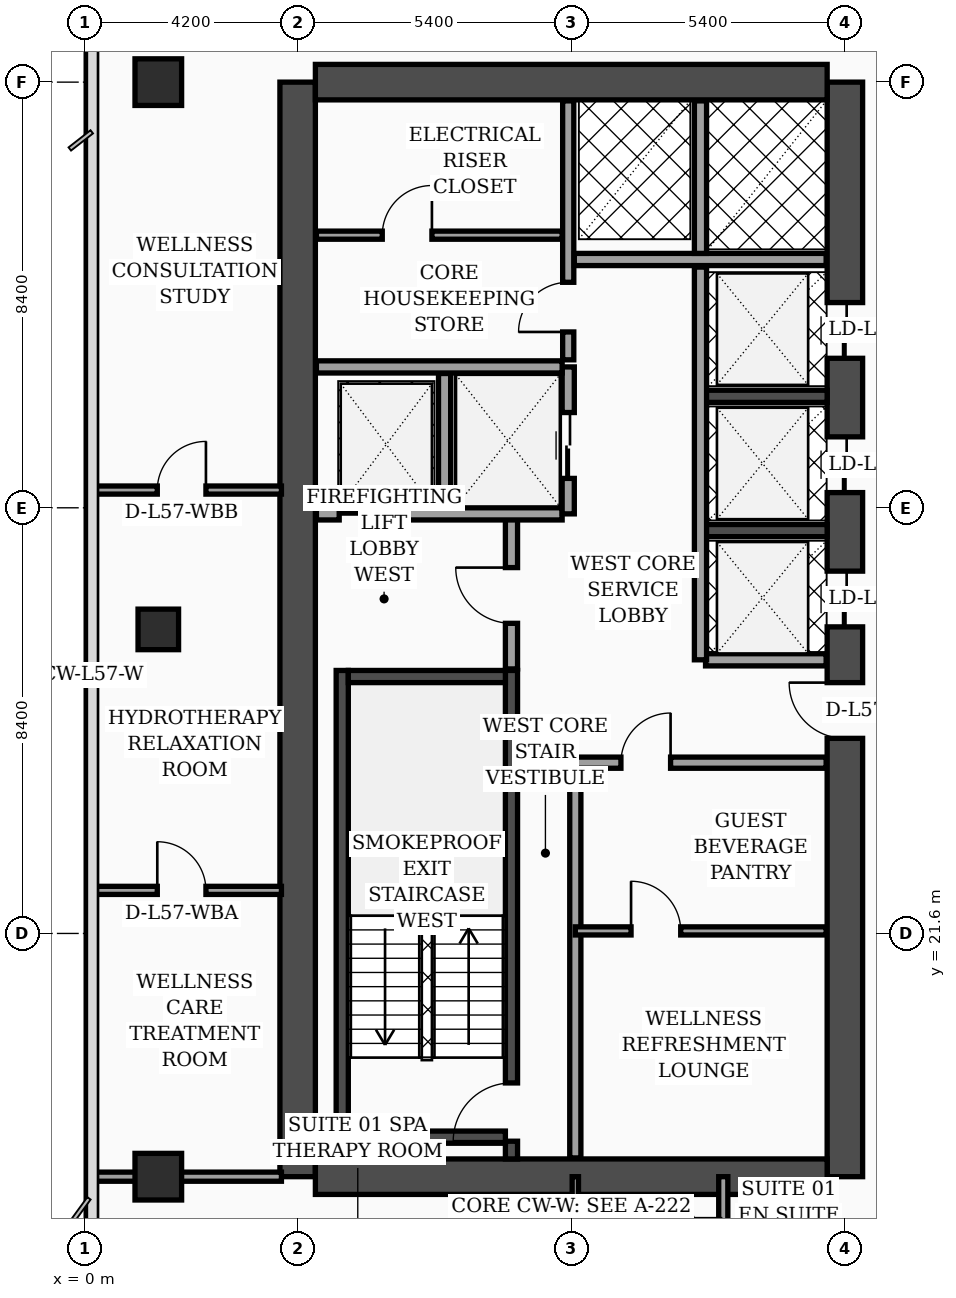
"""IFC4 building model, lengths in metres.
Left out: names, types, materials, properties, quantities, classifications, styles, units other than length and angle.
Written with IfcOpenShell. Run it as: python <this file> out.ifc"""

import sys

from ifc_helpers import new_model, si_unit, direction, frame, frame_2d, origin, origin_2d, place, context, subcontext, project, spatial, rectangle, extrude, element, fill, save


model = new_model("IFC4")
c1 = context("Model", 3, precision=1e-05, world=origin(), true_north=direction((0.0, 1.0)))
c2 = subcontext(c1, "Body", "Model", "MODEL_VIEW")
j1 = project(units=[si_unit("LENGTHUNIT", "METRE"), si_unit("PLANEANGLEUNIT", "RADIAN")], contexts=[c1])
p1 = place(None, origin())
s1 = spatial("IfcSite", under=j1, at=p1, CompositionType="ELEMENT")
p2 = place(p1, origin())
s2 = spatial("IfcBuilding", under=s1, at=p2, CompositionType="ELEMENT")
p3 = place(p2, frame((0.0, 0.0, 230.7)))
s3 = spatial("IfcBuildingStorey", under=s2, at=p3, CompositionType="ELEMENT", Elevation=230.7)
p4 = place(p3, frame((4.2, 16.8, 0.0), z_axis=(0.0, 0.0, 1.0), x_axis=(0.0, 1.0, 0.0)))
e1 = element("IfcWall", 1, at=p4, inside=s3, PredefinedType="SHEAR", context=c2, shape_type="SweptSolid", body=[
    extrude(rectangle(XDim=21.6, YDim=0.7, at=frame_2d((10.8, 0.0))), origin(), (0.0, 0.0, 1.0), 3.52),
])
p5 = place(p3, frame((15.0, 16.8, 0.0), z_axis=(0.0, 0.0, 1.0), x_axis=(0.0, 1.0, 0.0)))
e2 = element("IfcWall", 2, at=p5, inside=s3, PredefinedType="SHEAR", context=c2, shape_type="SweptSolid", body=[
    extrude(rectangle(XDim=21.6, YDim=0.7, at=frame_2d((10.8, 0.0))), origin(), (0.0, 0.0, 1.0), 3.52),
])
p6 = place(p5, frame((8.65, 0.0, 0.0)))
e3 = element("IfcOpeningElement", 3, at=p6, cuts=e2, PredefinedType="OPENING", context=c2, shape_type="SweptSolid", body=[
    extrude(rectangle(XDim=1.1, YDim=2.2, at=frame_2d((0.55, 1.1))), frame((0.0, 0.36, 0.0), z_axis=(0.0, -1.0, 0.0), x_axis=(1.0, 0.0, 0.0)), (0.0, 0.0, 1.0), 0.72),
])
p7 = place(p5, frame((10.85, 0.0, 0.0)))
e4 = element("IfcOpeningElement", 4, at=p7, cuts=e2, PredefinedType="OPENING", context=c2, shape_type="SweptSolid", body=[
    extrude(rectangle(XDim=1.1, YDim=2.2, at=frame_2d((0.55, 1.1))), frame((0.0, 0.36, 0.0), z_axis=(0.0, -1.0, 0.0), x_axis=(1.0, 0.0, 0.0)), (0.0, 0.0, 1.0), 0.72),
])
p8 = place(p5, frame((13.5, 0.0, 0.0)))
e5 = element("IfcOpeningElement", 5, at=p8, cuts=e2, PredefinedType="OPENING", context=c2, shape_type="SweptSolid", body=[
    extrude(rectangle(XDim=1.1, YDim=2.2, at=frame_2d((0.55, 1.1))), frame((0.0, 0.36, 0.0), z_axis=(0.0, -1.0, 0.0), x_axis=(1.0, 0.0, 0.0)), (0.0, 0.0, 1.0), 0.72),
])
p9 = place(p5, frame((16.15, 0.0, 0.0)))
e6 = element("IfcOpeningElement", 6, at=p9, cuts=e2, PredefinedType="OPENING", context=c2, shape_type="SweptSolid", body=[
    extrude(rectangle(XDim=1.1, YDim=2.2, at=frame_2d((0.55, 1.1))), frame((0.0, 0.36, 0.0), z_axis=(0.0, -1.0, 0.0), x_axis=(1.0, 0.0, 0.0)), (0.0, 0.0, 1.0), 0.72),
])
for number, where, z_axis, x_axis in (
    (7, (4.55, 38.4, 0.0), (0.0, 0.0, 1.0), (1.0, 0.0, 0.0)),
    (8, (4.55, 16.8, 0.0), (0.0, 0.0, 1.0), (1.0, 0.0, 0.0)),
):
    element("IfcWall", number, at=place(p3, frame(where, z_axis=z_axis, x_axis=x_axis)), inside=s3, PredefinedType="SHEAR", context=c2, shape_type="SweptSolid", body=[
        extrude(rectangle(XDim=10.1, YDim=0.7, at=frame_2d((5.05, 0.0))), origin(), (0.0, 0.0, 1.0), 3.52),
    ])
p10 = place(p3, frame((5.08, 17.15, 0.0), z_axis=(0.0, 0.0, 1.0), x_axis=(0.0, 1.0, 0.0)))
e9 = element("IfcWall", 9, at=p10, inside=s3, PredefinedType="SOLIDWALL", context=c2, shape_type="SweptSolid", body=[
    extrude(rectangle(XDim=9.64, YDim=0.24, at=frame_2d((4.82, 0.0))), origin(), (0.0, 0.0, 1.0), 3.52),
])
p11 = place(p3, frame((8.42, 17.15, 0.0), z_axis=(0.0, 0.0, 1.0), x_axis=(0.0, 1.0, 0.0)))
e10 = element("IfcWall", 10, at=p11, inside=s3, PredefinedType="SOLIDWALL", context=c2, shape_type="SweptSolid", body=[
    extrude(rectangle(XDim=9.64, YDim=0.24, at=frame_2d((4.82, 0.0))), origin(), (0.0, 0.0, 1.0), 3.52),
])
p12 = place(p11, frame((0.35, 0.0, 0.0)))
e11 = element("IfcOpeningElement", 11, at=p12, cuts=e10, PredefinedType="OPENING", context=c2, shape_type="SweptSolid", body=[
    extrude(rectangle(XDim=1.15, YDim=2.2, at=frame_2d((0.575, 1.1))), frame((0.0, 0.13, 0.0), z_axis=(0.0, -1.0, 0.0), x_axis=(1.0, 0.0, 0.0)), (0.0, 0.0, 1.0), 0.26),
])
for number, where, z_axis, x_axis in (
    (12, (5.2, 17.58, 0.0), (0.0, 0.0, 1.0), (1.0, 0.0, 0.0)),
    (13, (5.2, 26.67, 0.0), (0.0, 0.0, 1.0), (1.0, 0.0, 0.0)),
):
    element("IfcWall", number, at=place(p3, frame(where, z_axis=z_axis, x_axis=x_axis)), inside=s3, PredefinedType="SOLIDWALL", context=c2, shape_type="SweptSolid", body=[
        extrude(rectangle(XDim=3.1, YDim=0.24, at=frame_2d((1.55, 0.0))), origin(), (0.0, 0.0, 1.0), 3.52),
    ])
for number, where, z_axis, x_axis in (
    (14, (12.18, 29.55, 0.0), (0.0, 0.0, 1.0), (1.0, 0.0, 0.0)),
    (15, (12.18, 32.2, 0.0), (0.0, 0.0, 1.0), (1.0, 0.0, 0.0)),
):
    element("IfcWall", number, at=place(p3, frame(where, z_axis=z_axis, x_axis=x_axis)), inside=s3, PredefinedType="SOLIDWALL", context=c2, shape_type="SweptSolid", body=[
        extrude(rectangle(XDim=2.47, YDim=0.24, at=frame_2d((1.235, 0.0))), origin(), (0.0, 0.0, 1.0), 3.52),
    ])
p13 = place(p3, frame((1.45, 16.8, 0.0), z_axis=(0.0, 0.0, 1.0), x_axis=(1.0, 0.0, 0.0)))
e16 = element("IfcColumn", 16, at=p13, inside=s3, PredefinedType="COLUMN", context=c2, shape_type="SweptSolid", body=[
    extrude(rectangle(XDim=0.92, YDim=0.92, at=origin_2d()), origin(), (0.0, 0.0, 1.0), 3.52),
])
p14 = place(p3, frame((1.45, 27.6, 0.0), z_axis=(0.0, 0.0, 1.0), x_axis=(1.0, 0.0, 0.0)))
e17 = element("IfcColumn", 17, at=p14, inside=s3, PredefinedType="COLUMN", context=c2, shape_type="SweptSolid", body=[
    extrude(rectangle(XDim=0.8, YDim=0.8, at=origin_2d()), origin(), (0.0, 0.0, 1.0), 3.52),
])
p15 = place(p3, frame((1.45, 38.4, 0.0), z_axis=(0.0, 0.0, 1.0), x_axis=(1.0, 0.0, 0.0)))
e18 = element("IfcColumn", 18, at=p15, inside=s3, PredefinedType="COLUMN", context=c2, shape_type="SweptSolid", body=[
    extrude(rectangle(XDim=0.92, YDim=0.92, at=origin_2d()), origin(), (0.0, 0.0, 1.0), 3.52),
])
p16 = place(p3, frame((8.42, 26.82, 0.0), z_axis=(0.0, 0.0, 1.0), x_axis=(0.0, 1.0, 0.0)))
e19 = element("IfcWall", 19, at=p16, inside=s3, PredefinedType="SOLIDWALL", context=c2, shape_type="SweptSolid", body=[
    extrude(rectangle(XDim=3.0, YDim=0.24, at=frame_2d((1.5, 0.0))), origin(), (0.0, 0.0, 1.0), 3.52),
])
p17 = place(p16, frame((0.9, 0.0, 0.0)))
e20 = element("IfcOpeningElement", 20, at=p17, cuts=e19, PredefinedType="OPENING", context=c2, shape_type="SweptSolid", body=[
    extrude(rectangle(XDim=1.1, YDim=2.2, at=frame_2d((0.55, 1.1))), frame((0.0, 0.13, 0.0), z_axis=(0.0, -1.0, 0.0), x_axis=(1.0, 0.0, 0.0)), (0.0, 0.0, 1.0), 0.26),
])
p18 = place(p3, frame((4.57, 29.88, 0.0), z_axis=(0.0, 0.0, 1.0), x_axis=(1.0, 0.0, 0.0)))
e21 = element("IfcWall", 21, at=p18, inside=s3, PredefinedType="SOLIDWALL", context=c2, shape_type="SweptSolid", body=[
    extrude(rectangle(XDim=4.85, YDim=0.24, at=frame_2d((2.425, 0.0))), origin(), (0.0, 0.0, 1.0), 3.52),
])
p19 = place(p18, frame((0.45, 0.0, 0.0)))
e22 = element("IfcOpeningElement", 22, at=p19, cuts=e21, PredefinedType="OPENING", context=c2, shape_type="SweptSolid", body=[
    extrude(rectangle(XDim=1.3, YDim=2.35, at=frame_2d((0.65, 1.175))), frame((0.0, 0.13, 0.0), z_axis=(0.0, -1.0, 0.0), x_axis=(1.0, 0.0, 0.0)), (0.0, 0.0, 1.0), 0.26),
])
p20 = place(p3, frame((7.1, 30.02, 0.0), z_axis=(0.0, 0.0, 1.0), x_axis=(0.0, 1.0, 0.0)))
e23 = element("IfcWall", 23, at=p20, inside=s3, PredefinedType="SOLIDWALL", context=c2, shape_type="SweptSolid", body=[
    extrude(rectangle(XDim=2.63, YDim=0.24, at=frame_2d((1.315, 0.0))), origin(), (0.0, 0.0, 1.0), 3.52),
])
p21 = place(p3, frame((9.54, 29.88, 0.0), z_axis=(0.0, 0.0, 1.0), x_axis=(0.0, 1.0, 0.0)))
e24 = element("IfcWall", 24, at=p21, inside=s3, PredefinedType="SOLIDWALL", context=c2, shape_type="SweptSolid", body=[
    extrude(rectangle(XDim=2.9, YDim=0.24, at=frame_2d((1.45, 0.0))), origin(), (0.0, 0.0, 1.0), 3.52),
])
p22 = place(p21, frame((0.7, 0.0, 0.0)))
e25 = element("IfcOpeningElement", 25, at=p22, cuts=e24, PredefinedType="OPENING", context=c2, shape_type="SweptSolid", body=[
    extrude(rectangle(XDim=1.3, YDim=2.35, at=frame_2d((0.65, 1.175))), frame((0.0, 0.13, 0.0), z_axis=(0.0, -1.0, 0.0), x_axis=(1.0, 0.0, 0.0)), (0.0, 0.0, 1.0), 0.26),
])
p23 = place(p3, frame((4.57, 32.78, 0.0), z_axis=(0.0, 0.0, 1.0), x_axis=(1.0, 0.0, 0.0)))
e26 = element("IfcWall", 26, at=p23, inside=s3, PredefinedType="SOLIDWALL", context=c2, shape_type="SweptSolid", body=[
    extrude(rectangle(XDim=4.85, YDim=0.24, at=frame_2d((2.425, 0.0))), origin(), (0.0, 0.0, 1.0), 3.17),
])
p24 = place(p3, frame((9.68, 17.17, 0.0), z_axis=(0.0, 0.0, 1.0), x_axis=(0.0, 1.0, 0.0)))
e27 = element("IfcWall", 27, at=p24, inside=s3, PredefinedType="SOLIDWALL", context=c2, shape_type="SweptSolid", body=[
    extrude(rectangle(XDim=7.83, YDim=0.22, at=frame_2d((3.915, 0.0))), origin(), (0.0, 0.0, 1.0), 3.52),
])
p25 = place(p3, frame((4.57, 35.38, 0.0), z_axis=(0.0, 0.0, 1.0), x_axis=(1.0, 0.0, 0.0)))
e28 = element("IfcWall", 28, at=p25, inside=s3, PredefinedType="PARTITIONING", context=c2, shape_type="SweptSolid", body=[
    extrude(rectangle(XDim=4.85, YDim=0.16, at=frame_2d((2.425, 0.0))), origin(), (0.0, 0.0, 1.0), 3.52),
])
p26 = place(p25, frame((1.3, 0.0, 0.0)))
e29 = element("IfcOpeningElement", 29, at=p26, cuts=e28, PredefinedType="OPENING", context=c2, shape_type="SweptSolid", body=[
    extrude(rectangle(XDim=0.98, YDim=2.15, at=frame_2d((0.49, 1.075))), frame((0.0, 0.09, 0.0), z_axis=(0.0, -1.0, 0.0), x_axis=(1.0, 0.0, 0.0)), (0.0, 0.0, 1.0), 0.18),
])
p27 = place(p3, frame((9.54, 32.92, 0.0), z_axis=(0.0, 0.0, 1.0), x_axis=(0.0, 1.0, 0.0)))
e30 = element("IfcWall", 30, at=p27, inside=s3, PredefinedType="SOLIDWALL", context=c2, shape_type="SweptSolid", body=[
    extrude(rectangle(XDim=5.11, YDim=0.22, at=frame_2d((2.555, 0.0))), origin(), (0.0, 0.0, 1.0), 3.52),
])
p28 = place(p27, frame((0.55, 0.0, 0.0)))
e31 = element("IfcOpeningElement", 31, at=p28, cuts=e30, PredefinedType="OPENING", context=c2, shape_type="SweptSolid", body=[
    extrude(rectangle(XDim=0.98, YDim=2.15, at=frame_2d((0.49, 1.075))), frame((0.0, 0.12, 0.0), z_axis=(0.0, -1.0, 0.0), x_axis=(1.0, 0.0, 0.0)), (0.0, 0.0, 1.0), 0.24),
])
p29 = place(p3, frame((9.68, 21.65, 0.0), z_axis=(0.0, 0.0, 1.0), x_axis=(1.0, 0.0, 0.0)))
e32 = element("IfcWall", 32, at=p29, inside=s3, PredefinedType="PARTITIONING", context=c2, shape_type="SweptSolid", body=[
    extrude(rectangle(XDim=4.95, YDim=0.16, at=frame_2d((2.475, 0.0))), origin(), (0.0, 0.0, 1.0), 3.52),
])
p30 = place(p29, frame((1.1, 0.0, 0.0)))
e33 = element("IfcOpeningElement", 33, at=p30, cuts=e32, PredefinedType="OPENING", context=c2, shape_type="SweptSolid", body=[
    extrude(rectangle(XDim=0.98, YDim=2.15, at=frame_2d((0.49, 1.075))), frame((0.0, 0.09, 0.0), z_axis=(0.0, -1.0, 0.0), x_axis=(1.0, 0.0, 0.0)), (0.0, 0.0, 1.0), 0.18),
])
p31 = place(p3, frame((9.68, 24.97, 0.0), z_axis=(0.0, 0.0, 1.0), x_axis=(1.0, 0.0, 0.0)))
e34 = element("IfcWall", 34, at=p31, inside=s3, PredefinedType="SOLIDWALL", context=c2, shape_type="SweptSolid", body=[
    extrude(rectangle(XDim=4.95, YDim=0.22, at=frame_2d((2.475, 0.0))), origin(), (0.0, 0.0, 1.0), 2.92),
])
p32 = place(p31, frame((0.9, 0.0, 0.0)))
e35 = element("IfcOpeningElement", 35, at=p32, cuts=e34, PredefinedType="OPENING", context=c2, shape_type="SweptSolid", body=[
    extrude(rectangle(XDim=0.98, YDim=2.15, at=frame_2d((0.49, 1.075))), frame((0.0, 0.12, 0.0), z_axis=(0.0, -1.0, 0.0), x_axis=(1.0, 0.0, 0.0)), (0.0, 0.0, 1.0), 0.24),
])
p33 = place(p3, frame((12.25, 27.0, 0.0), z_axis=(0.0, 0.0, 1.0), x_axis=(1.0, 0.0, 0.0)))
e36 = element("IfcWall", 36, at=p33, inside=s3, PredefinedType="SOLIDWALL", context=c2, shape_type="SweptSolid", body=[
    extrude(rectangle(XDim=2.38, YDim=0.24, at=frame_2d((1.19, 0.0))), origin(), (0.0, 0.0, 1.0), 3.52),
])
p34 = place(p3, frame((12.15, 27.0, 0.0), z_axis=(0.0, 0.0, 1.0), x_axis=(0.0, 1.0, 0.0)))
e37 = element("IfcWall", 37, at=p34, inside=s3, PredefinedType="SOLIDWALL", context=c2, shape_type="SweptSolid", body=[
    extrude(rectangle(XDim=7.75, YDim=0.24, at=frame_2d((3.875, 0.0))), origin(), (0.0, 0.0, 1.0), 3.52),
])
p35 = place(p3, frame((9.66, 34.9, 0.0), z_axis=(0.0, 0.0, 1.0), x_axis=(1.0, 0.0, 0.0)))
e38 = element("IfcWall", 38, at=p35, inside=s3, PredefinedType="SOLIDWALL", context=c2, shape_type="SweptSolid", body=[
    extrude(rectangle(XDim=4.97, YDim=0.24, at=frame_2d((2.485, 0.0))), origin(), (0.0, 0.0, 1.0), 3.52),
])
p36 = place(p3, frame((12.15, 35.02, 0.0), z_axis=(0.0, 0.0, 1.0), x_axis=(0.0, 1.0, 0.0)))
e39 = element("IfcWall", 39, at=p36, inside=s3, PredefinedType="SOLIDWALL", context=c2, shape_type="SweptSolid", body=[
    extrude(rectangle(XDim=3.01, YDim=0.24, at=frame_2d((1.505, 0.0))), origin(), (0.0, 0.0, 1.0), 3.52),
])
p37 = place(p3, frame((0.08, 22.45, 0.0), z_axis=(0.0, 0.0, 1.0), x_axis=(1.0, 0.0, 0.0)))
e40 = element("IfcWall", 40, at=p37, inside=s3, PredefinedType="PARTITIONING", context=c2, shape_type="SweptSolid", body=[
    extrude(rectangle(XDim=3.8, YDim=0.16, at=frame_2d((1.9, 0.0))), origin(), (0.0, 0.0, 1.0), 3.07),
])
p38 = place(p37, frame((1.35, 0.0, 0.0)))
e41 = element("IfcOpeningElement", 41, at=p38, cuts=e40, PredefinedType="OPENING", context=c2, shape_type="SweptSolid", body=[
    extrude(rectangle(XDim=0.96, YDim=2.2, at=frame_2d((0.48, 1.1))), frame((0.0, 0.09, 0.0), z_axis=(0.0, -1.0, 0.0), x_axis=(1.0, 0.0, 0.0)), (0.0, 0.0, 1.0), 0.18),
])
p39 = place(p3, frame((0.08, 30.35, 0.0), z_axis=(0.0, 0.0, 1.0), x_axis=(1.0, 0.0, 0.0)))
e42 = element("IfcWall", 42, at=p39, inside=s3, PredefinedType="PARTITIONING", context=c2, shape_type="SweptSolid", body=[
    extrude(rectangle(XDim=3.8, YDim=0.16, at=frame_2d((1.9, 0.0))), origin(), (0.0, 0.0, 1.0), 3.07),
])
p40 = place(p39, frame((1.35, 0.0, 0.0)))
e43 = element("IfcOpeningElement", 43, at=p40, cuts=e42, PredefinedType="OPENING", context=c2, shape_type="SweptSolid", body=[
    extrude(rectangle(XDim=0.96, YDim=2.2, at=frame_2d((0.48, 1.1))), frame((0.0, 0.09, 0.0), z_axis=(0.0, -1.0, 0.0), x_axis=(1.0, 0.0, 0.0)), (0.0, 0.0, 1.0), 0.18),
])
p41 = place(p3, frame((0.08, 16.8, 0.0), z_axis=(0.0, 0.0, 1.0), x_axis=(1.0, 0.0, 0.0)))
e44 = element("IfcWall", 44, at=p41, inside=s3, PredefinedType="PARTITIONING", context=c2, shape_type="SweptSolid", body=[
    extrude(rectangle(XDim=3.8, YDim=0.18, at=frame_2d((1.9, 0.0))), origin(), (0.0, 0.0, 1.0), 2.92),
])
p42 = place(p3, frame((9.68, 14.55, 0.0), z_axis=(0.0, 0.0, 1.0), x_axis=(0.0, 1.0, 0.0)))
e45 = element("IfcWall", 45, at=p42, inside=s3, PredefinedType="PARTITIONING", context=c2, shape_type="SweptSolid", body=[
    extrude(rectangle(XDim=2.25, YDim=0.125, at=frame_2d((1.125, 0.0))), origin(), (0.0, 0.0, 1.0), 3.52),
])
p43 = place(p3, frame((12.6, 2.44, 0.0), z_axis=(0.0, 0.0, 1.0), x_axis=(0.0, 1.0, 0.0)))
e46 = element("IfcWall", 46, at=p43, inside=s3, PredefinedType="PARTITIONING", context=c2, shape_type="SweptSolid", body=[
    extrude(rectangle(XDim=14.36, YDim=0.18, at=frame_2d((7.18, 0.0))), origin(), (0.0, 0.0, 1.0), 2.92),
])
p44 = place(p43, frame((3.01, 0.0, 0.0)))
e47 = element("IfcOpeningElement", 47, at=p44, cuts=e46, PredefinedType="OPENING", context=c2, shape_type="SweptSolid", body=[
    extrude(rectangle(XDim=1.02, YDim=2.2, at=frame_2d((0.51, 1.1))), frame((0.0, 0.1, 0.0), z_axis=(0.0, -1.0, 0.0), x_axis=(1.0, 0.0, 0.0)), (0.0, 0.0, 1.0), 0.2),
])
p45 = place(p17, origin())
e48 = element("IfcDoor", 48, at=p45, inside=s3, OperationType="SINGLE_SWING_RIGHT", PredefinedType="DOOR", context=c2, shape_type="SweptSolid", body=[
    extrude(rectangle(XDim=1.1, YDim=2.2, at=frame_2d((0.55, 1.1))), frame((0.0, 0.025, 0.0), z_axis=(0.0, -1.0, 0.0), x_axis=(1.0, 0.0, 0.0)), (0.0, 0.0, 1.0), 0.05),
])
fill(e20, e48)
p46 = place(p19, origin())
e49 = element("IfcDoor", 49, at=p46, inside=s3, OperationType="DOUBLE_DOOR_SLIDING", PredefinedType="DOOR", context=c2, shape_type="SweptSolid", body=[
    extrude(rectangle(XDim=1.3, YDim=2.35, at=frame_2d((0.65, 1.175))), frame((0.0, 0.025, 0.0), z_axis=(0.0, -1.0, 0.0), x_axis=(1.0, 0.0, 0.0)), (0.0, 0.0, 1.0), 0.05),
])
fill(e22, e49)
p47 = place(p22, origin())
e50 = element("IfcDoor", 50, at=p47, inside=s3, OperationType="DOUBLE_DOOR_SLIDING", PredefinedType="DOOR", context=c2, shape_type="SweptSolid", body=[
    extrude(rectangle(XDim=1.3, YDim=2.35, at=frame_2d((0.65, 1.175))), frame((0.0, 0.025, 0.0), z_axis=(0.0, -1.0, 0.0), x_axis=(1.0, 0.0, 0.0)), (0.0, 0.0, 1.0), 0.05),
])
fill(e25, e50)
p48 = place(p26, origin())
e51 = element("IfcDoor", 51, at=p48, inside=s3, OperationType="SINGLE_SWING_RIGHT", PredefinedType="DOOR", context=c2, shape_type="SweptSolid", body=[
    extrude(rectangle(XDim=0.98, YDim=2.15, at=frame_2d((0.49, 1.075))), frame((0.0, 0.025, 0.0), z_axis=(0.0, -1.0, 0.0), x_axis=(1.0, 0.0, 0.0)), (0.0, 0.0, 1.0), 0.05),
])
fill(e29, e51)
p49 = place(p28, origin())
e52 = element("IfcDoor", 52, at=p49, inside=s3, OperationType="SINGLE_SWING_LEFT", PredefinedType="DOOR", context=c2, shape_type="SweptSolid", body=[
    extrude(rectangle(XDim=0.98, YDim=2.15, at=frame_2d((0.49, 1.075))), frame((0.0, 0.025, 0.0), z_axis=(0.0, -1.0, 0.0), x_axis=(1.0, 0.0, 0.0)), (0.0, 0.0, 1.0), 0.05),
])
fill(e31, e52)
p50 = place(p30, origin())
e53 = element("IfcDoor", 53, at=p50, inside=s3, OperationType="SINGLE_SWING_LEFT", PredefinedType="DOOR", context=c2, shape_type="SweptSolid", body=[
    extrude(rectangle(XDim=0.98, YDim=2.15, at=frame_2d((0.49, 1.075))), frame((0.0, 0.025, 0.0), z_axis=(0.0, -1.0, 0.0), x_axis=(1.0, 0.0, 0.0)), (0.0, 0.0, 1.0), 0.05),
])
fill(e33, e53)
p51 = place(p32, origin())
e54 = element("IfcDoor", 54, at=p51, inside=s3, OperationType="SINGLE_SWING_RIGHT", PredefinedType="DOOR", context=c2, shape_type="SweptSolid", body=[
    extrude(rectangle(XDim=0.98, YDim=2.15, at=frame_2d((0.49, 1.075))), frame((0.0, 0.025, 0.0), z_axis=(0.0, -1.0, 0.0), x_axis=(1.0, 0.0, 0.0)), (0.0, 0.0, 1.0), 0.05),
])
fill(e35, e54)
p52 = place(p38, origin())
e55 = element("IfcDoor", 55, at=p52, inside=s3, OperationType="SINGLE_SWING_LEFT", PredefinedType="DOOR", context=c2, shape_type="SweptSolid", body=[
    extrude(rectangle(XDim=0.96, YDim=2.2, at=frame_2d((0.48, 1.1))), frame((0.0, 0.025, 0.0), z_axis=(0.0, -1.0, 0.0), x_axis=(1.0, 0.0, 0.0)), (0.0, 0.0, 1.0), 0.05),
])
fill(e41, e55)
p53 = place(p40, origin())
e56 = element("IfcDoor", 56, at=p53, inside=s3, OperationType="SINGLE_SWING_RIGHT", PredefinedType="DOOR", context=c2, shape_type="SweptSolid", body=[
    extrude(rectangle(XDim=0.96, YDim=2.2, at=frame_2d((0.48, 1.1))), frame((0.0, 0.025, 0.0), z_axis=(0.0, -1.0, 0.0), x_axis=(1.0, 0.0, 0.0)), (0.0, 0.0, 1.0), 0.05),
])
fill(e43, e56)
p54 = place(p12, origin())
e57 = element("IfcDoor", 57, at=p54, inside=s3, OperationType="SINGLE_SWING_LEFT", PredefinedType="DOOR", context=c2, shape_type="SweptSolid", body=[
    extrude(rectangle(XDim=1.15, YDim=2.2, at=frame_2d((0.575, 1.1))), frame((0.0, 0.025, 0.0), z_axis=(0.0, -1.0, 0.0), x_axis=(1.0, 0.0, 0.0)), (0.0, 0.0, 1.0), 0.05),
])
fill(e11, e57)
p55 = place(p6, origin())
e58 = element("IfcDoor", 58, at=p55, inside=s3, OperationType="SINGLE_SWING_RIGHT", PredefinedType="DOOR", context=c2, shape_type="SweptSolid", body=[
    extrude(rectangle(XDim=1.1, YDim=2.2, at=frame_2d((0.55, 1.1))), frame((0.0, 0.025, 0.0), z_axis=(0.0, -1.0, 0.0), x_axis=(1.0, 0.0, 0.0)), (0.0, 0.0, 1.0), 0.05),
])
fill(e3, e58)
p56 = place(p7, origin())
e59 = element("IfcDoor", 59, at=p56, inside=s3, OperationType="DOUBLE_DOOR_SLIDING", PredefinedType="DOOR", context=c2, shape_type="SweptSolid", body=[
    extrude(rectangle(XDim=1.1, YDim=2.2, at=frame_2d((0.55, 1.1))), frame((0.0, 0.025, 0.0), z_axis=(0.0, -1.0, 0.0), x_axis=(1.0, 0.0, 0.0)), (0.0, 0.0, 1.0), 0.05),
])
fill(e4, e59)
p57 = place(p8, origin())
e60 = element("IfcDoor", 60, at=p57, inside=s3, OperationType="DOUBLE_DOOR_SLIDING", PredefinedType="DOOR", context=c2, shape_type="SweptSolid", body=[
    extrude(rectangle(XDim=1.1, YDim=2.2, at=frame_2d((0.55, 1.1))), frame((0.0, 0.025, 0.0), z_axis=(0.0, -1.0, 0.0), x_axis=(1.0, 0.0, 0.0)), (0.0, 0.0, 1.0), 0.05),
])
fill(e5, e60)
p58 = place(p9, origin())
e61 = element("IfcDoor", 61, at=p58, inside=s3, OperationType="DOUBLE_DOOR_SLIDING", PredefinedType="DOOR", context=c2, shape_type="SweptSolid", body=[
    extrude(rectangle(XDim=1.1, YDim=2.2, at=frame_2d((0.55, 1.1))), frame((0.0, 0.025, 0.0), z_axis=(0.0, -1.0, 0.0), x_axis=(1.0, 0.0, 0.0)), (0.0, 0.0, 1.0), 0.05),
])
fill(e6, e61)
save(model, sys.argv[1])
